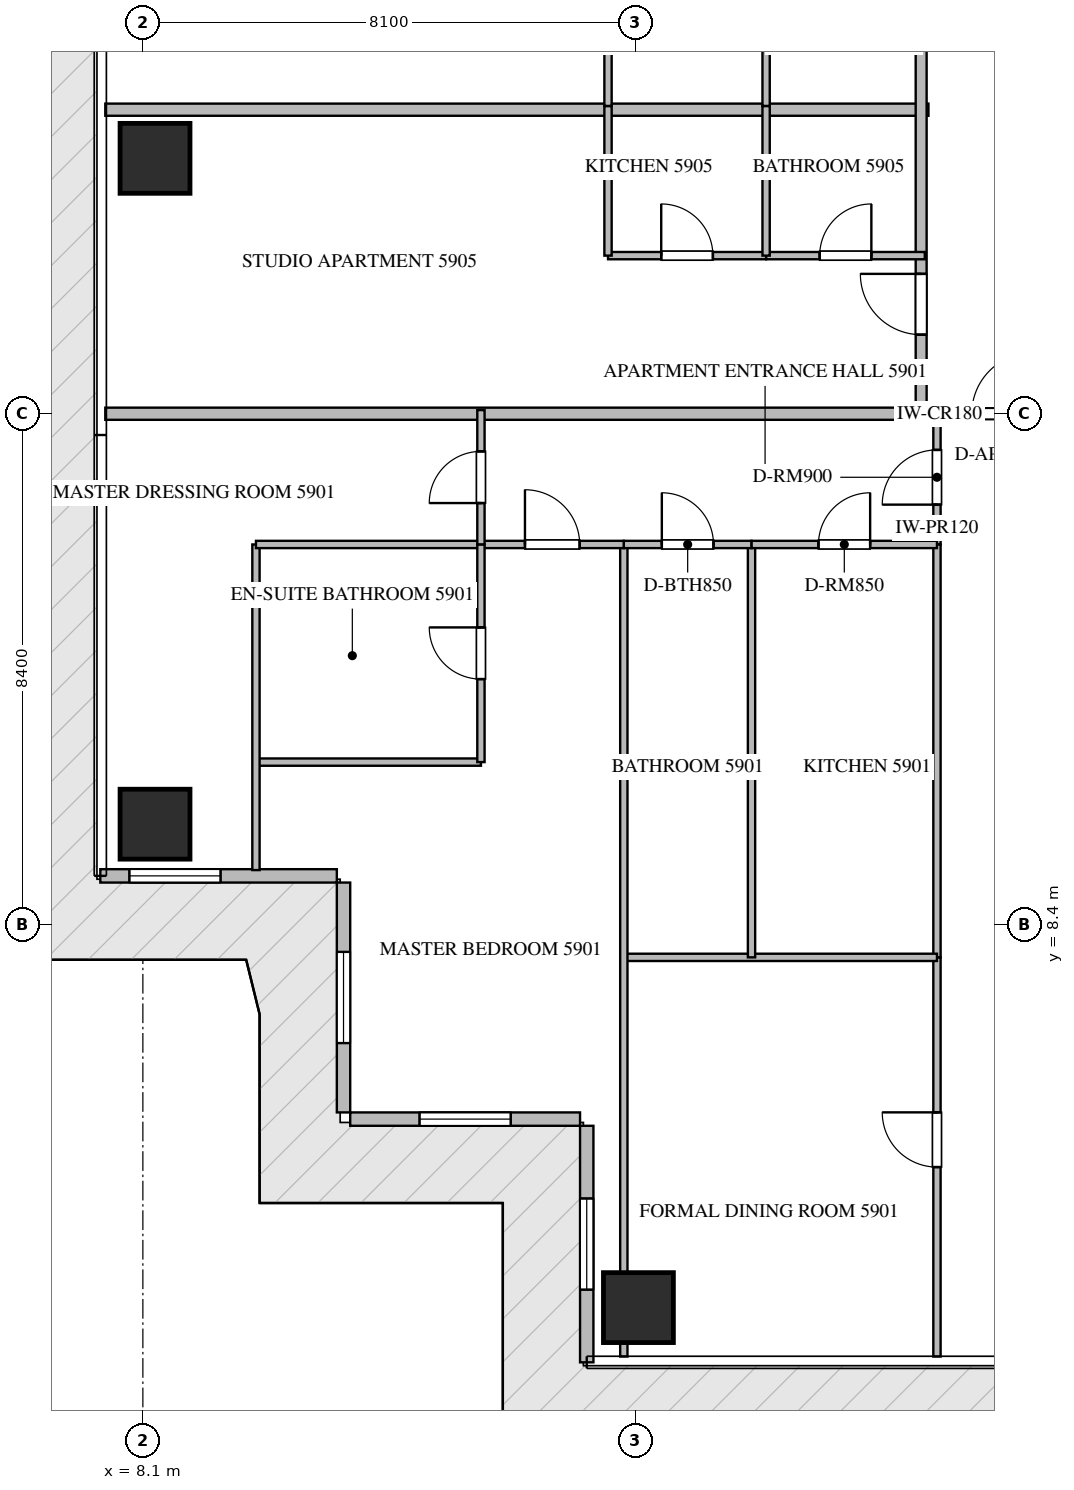
"""IFC4 building model, lengths in metres.
Left out: names, types, materials, properties, quantities, classifications, styles, units other than length and angle.
Written with IfcOpenShell. Run it as: python <this file> out.ifc"""

import sys

from ifc_helpers import new_model, si_unit, direction, frame, frame_2d, origin, origin_2d, place, context, subcontext, project, spatial, rectangle, extrude, source, transform, mapped, element, fill, save


model = new_model("IFC4")
c1 = context("Model", 3, precision=1e-05, world=origin(), true_north=direction((0.0, 1.0)))
c2 = subcontext(c1, "Body", "Model", "MODEL_VIEW")
j1 = project(units=[si_unit("LENGTHUNIT", "METRE"), si_unit("PLANEANGLEUNIT", "RADIAN")], contexts=[c1])
p1 = place(None, origin())
s1 = spatial("IfcSite", under=j1, at=p1, CompositionType="ELEMENT")
p2 = place(p1, origin())
s2 = spatial("IfcBuilding", under=s1, at=p2, CompositionType="ELEMENT")
p3 = place(p2, frame((0.0, 0.0, 237.4)))
s3 = spatial("IfcBuildingStorey", under=s2, at=p3, CompositionType="ELEMENT", Elevation=237.4)
m1 = source(origin(), c2, "Body", "SweptSolid", [
    extrude(rectangle(XDim=1.15, YDim=1.15, at=origin_2d()), origin(), (0.0, 0.0, 1.0), 3.85),
])
for number, where, z_axis, x_axis in (
    (1, (16.25, 2.1, -0.26), (0.0, 0.0, 1.0), (1.0, 0.0, 0.0)),
    (2, (8.3, 10.05, -0.26), (0.0, 0.0, 1.0), (1.0, 0.0, 0.0)),
    (3, (8.3, 21.0, -0.26), (0.0, 0.0, 1.0), (1.0, 0.0, 0.0)),
):
    element("IfcColumn", number, at=place(p3, frame(where, z_axis=z_axis, x_axis=x_axis)), inside=s3, PredefinedType="COLUMN", context=c2, shape_type="MappedRepresentation", body=[
        mapped(m1, transform((0.0, 0.0, 0.0), scale=1.0)),
    ])
p4 = place(p3, frame((7.4, 9.2, 0.0), z_axis=(0.0, 0.0, 1.0), x_axis=(1.0, 0.0, 0.0)))
e4 = element("IfcWall", 4, at=p4, inside=s3, PredefinedType="ELEMENTEDWALL", context=c2, shape_type="SweptSolid", body=[
    extrude(rectangle(XDim=3.89, YDim=0.22, at=frame_2d((1.945, 0.0))), origin(), (0.0, 0.0, 1.0), 3.575),
])
p5 = place(p4, frame((0.478, 0.0, 0.65)))
e5 = element("IfcOpeningElement", 5, at=p5, cuts=e4, PredefinedType="OPENING", context=c2, shape_type="SweptSolid", body=[
    extrude(rectangle(XDim=1.5, YDim=2.25, at=frame_2d((0.75, 1.125))), frame((0.0, 0.12, 0.0), z_axis=(0.0, -1.0, 0.0), x_axis=(1.0, 0.0, 0.0)), (0.0, 0.0, 1.0), 0.24),
])
p6 = place(p3, frame((11.4, 9.09, 0.0), z_axis=(0.0, 0.0, 1.0), x_axis=(0.0, -1.0, 0.0)))
e6 = element("IfcWall", 6, at=p6, inside=s3, PredefinedType="ELEMENTEDWALL", context=c2, shape_type="SweptSolid", body=[
    extrude(rectangle(XDim=3.78, YDim=0.22, at=frame_2d((1.89, 0.0))), origin(), (0.0, 0.0, 1.0), 3.575),
])
p7 = place(p6, frame((1.14, 0.0, 0.65)))
e7 = element("IfcOpeningElement", 7, at=p7, cuts=e6, PredefinedType="OPENING", context=c2, shape_type="SweptSolid", body=[
    extrude(rectangle(XDim=1.5, YDim=2.25, at=frame_2d((0.75, 1.125))), frame((0.0, 0.12, 0.0), z_axis=(0.0, -1.0, 0.0), x_axis=(1.0, 0.0, 0.0)), (0.0, 0.0, 1.0), 0.24),
])
p8 = place(p3, frame((11.51, 5.2, 0.0), z_axis=(0.0, 0.0, 1.0), x_axis=(1.0, 0.0, 0.0)))
e8 = element("IfcWall", 8, at=p8, inside=s3, PredefinedType="ELEMENTEDWALL", context=c2, shape_type="SweptSolid", body=[
    extrude(rectangle(XDim=3.78, YDim=0.22, at=frame_2d((1.89, 0.0))), origin(), (0.0, 0.0, 1.0), 3.575),
])
p9 = place(p8, frame((1.14, 0.0, 0.65)))
e9 = element("IfcOpeningElement", 9, at=p9, cuts=e8, PredefinedType="OPENING", context=c2, shape_type="SweptSolid", body=[
    extrude(rectangle(XDim=1.5, YDim=2.25, at=frame_2d((0.75, 1.125))), frame((0.0, 0.12, 0.0), z_axis=(0.0, -1.0, 0.0), x_axis=(1.0, 0.0, 0.0)), (0.0, 0.0, 1.0), 0.24),
])
p10 = place(p3, frame((15.4, 5.09, 0.0), z_axis=(0.0, 0.0, 1.0), x_axis=(0.0, -1.0, 0.0)))
e10 = element("IfcWall", 10, at=p10, inside=s3, PredefinedType="ELEMENTEDWALL", context=c2, shape_type="SweptSolid", body=[
    extrude(rectangle(XDim=3.89, YDim=0.22, at=frame_2d((1.945, 0.0))), origin(), (0.0, 0.0, 1.0), 3.575),
])
p11 = place(p10, frame((1.195, 0.0, 0.65)))
e11 = element("IfcOpeningElement", 11, at=p11, cuts=e10, PredefinedType="OPENING", context=c2, shape_type="SweptSolid", body=[
    extrude(rectangle(XDim=1.5, YDim=2.25, at=frame_2d((0.75, 1.125))), frame((0.0, 0.12, 0.0), z_axis=(0.0, -1.0, 0.0), x_axis=(1.0, 0.0, 0.0)), (0.0, 0.0, 1.0), 0.24),
])
p12 = place(p3, frame((7.482, 21.8, 0.0), z_axis=(0.0, 0.0, 1.0), x_axis=(1.0, 0.0, 0.0)))
e12 = element("IfcWall", 12, at=p12, inside=s3, PredefinedType="PARTITIONING", context=c2, shape_type="SweptSolid", body=[
    extrude(rectangle(XDim=13.538, YDim=0.2, at=frame_2d((6.769, 0.0))), origin(), (0.0, 0.0, 1.0), 3.59),
])
p13 = place(p3, frame((7.482, 16.8, 0.0), z_axis=(0.0, 0.0, 1.0), x_axis=(1.0, 0.0, 0.0)))
e13 = element("IfcWall", 13, at=p13, inside=s3, PredefinedType="PARTITIONING", context=c2, shape_type="SweptSolid", body=[
    extrude(rectangle(XDim=13.418, YDim=0.2, at=frame_2d((6.709, 0.0))), origin(), (0.0, 0.0, 1.0), 3.59),
])
p14 = place(p3, frame((20.902, 16.8, 0.0), z_axis=(0.0, 0.0, 1.0), x_axis=(1.0, 0.0, 0.0)))
e14 = element("IfcWall", 14, at=p14, inside=s3, PredefinedType="PARTITIONING", context=c2, shape_type="SweptSolid", body=[
    extrude(rectangle(XDim=2.496, YDim=0.18, at=frame_2d((1.248, 0.0))), origin(), (0.0, 0.0, 1.0), 3.59),
])
p15 = place(p14, frame((0.83, 0.0, 0.0)))
e15 = element("IfcOpeningElement", 15, at=p15, cuts=e14, PredefinedType="OPENING", context=c2, shape_type="SweptSolid", body=[
    extrude(rectangle(XDim=1.0, YDim=2.15, at=frame_2d((0.5, 1.075))), frame((0.0, 0.1, 0.0), z_axis=(0.0, -1.0, 0.0), x_axis=(1.0, 0.0, 0.0)), (0.0, 0.0, 1.0), 0.2),
])
p16 = place(p3, frame((20.9, 16.8, 0.0), z_axis=(0.0, 0.0, 1.0), x_axis=(0.0, 1.0, 0.0)))
e16 = element("IfcWall", 16, at=p16, inside=s3, PredefinedType="PARTITIONING", context=c2, shape_type="SweptSolid", body=[
    extrude(rectangle(XDim=16.8, YDim=0.18, at=frame_2d((8.4, 0.0))), origin(), (0.0, 0.0, 1.0), 3.59),
])
p17 = place(p16, frame((1.3, 0.0, 0.0)))
e17 = element("IfcOpeningElement", 17, at=p17, cuts=e16, PredefinedType="OPENING", context=c2, shape_type="SweptSolid", body=[
    extrude(rectangle(XDim=1.0, YDim=2.15, at=frame_2d((0.5, 1.075))), frame((0.0, 0.1, 0.0), z_axis=(0.0, -1.0, 0.0), x_axis=(1.0, 0.0, 0.0)), (0.0, 0.0, 1.0), 0.2),
])
p18 = place(p16, frame((9.18, 0.0, 0.0)))
e18 = element("IfcOpeningElement", 18, at=p18, cuts=e16, PredefinedType="OPENING", context=c2, shape_type="SweptSolid", body=[
    extrude(rectangle(XDim=1.0, YDim=2.15, at=frame_2d((0.5, 1.075))), frame((0.0, 0.1, 0.0), z_axis=(0.0, -1.0, 0.0), x_axis=(1.0, 0.0, 0.0)), (0.0, 0.0, 1.0), 0.2),
])
p19 = place(p16, frame((14.5, 0.0, 0.0)))
e19 = element("IfcOpeningElement", 19, at=p19, cuts=e16, PredefinedType="OPENING", context=c2, shape_type="SweptSolid", body=[
    extrude(rectangle(XDim=1.0, YDim=2.15, at=frame_2d((0.5, 1.075))), frame((0.0, 0.1, 0.0), z_axis=(0.0, -1.0, 0.0), x_axis=(1.0, 0.0, 0.0)), (0.0, 0.0, 1.0), 0.2),
])
p20 = place(p3, frame((21.16, 14.65, 0.0), z_axis=(0.0, 0.0, 1.0), x_axis=(0.0, 1.0, 0.0)))
e20 = element("IfcWall", 20, at=p20, inside=s3, PredefinedType="PARTITIONING", context=c2, shape_type="SweptSolid", body=[
    extrude(rectangle(XDim=2.21, YDim=0.12, at=frame_2d((1.105, 0.0))), origin(), (0.0, 0.0, 1.0), 3.59),
])
p21 = place(p20, frame((0.655, 0.0, 0.0)))
e21 = element("IfcOpeningElement", 21, at=p21, cuts=e20, PredefinedType="OPENING", context=c2, shape_type="SweptSolid", body=[
    extrude(rectangle(XDim=0.9, YDim=2.1, at=frame_2d((0.45, 1.05))), frame((0.0, 0.07, 0.0), z_axis=(0.0, -1.0, 0.0), x_axis=(1.0, 0.0, 0.0)), (0.0, 0.0, 1.0), 0.14),
])
p22 = place(p3, frame((21.16, 1.295, 0.0), z_axis=(0.0, 0.0, 1.0), x_axis=(0.0, 1.0, 0.0)))
e22 = element("IfcWall", 22, at=p22, inside=s3, PredefinedType="PARTITIONING", context=c2, shape_type="SweptSolid", body=[
    extrude(rectangle(XDim=6.565, YDim=0.12, at=frame_2d((3.283, 0.0))), origin(), (0.0, 0.0, 1.0), 3.59),
])
p23 = place(p22, frame((3.116, 0.0, 0.0)))
e23 = element("IfcOpeningElement", 23, at=p23, cuts=e22, PredefinedType="OPENING", context=c2, shape_type="SweptSolid", body=[
    extrude(rectangle(XDim=0.9, YDim=2.1, at=frame_2d((0.45, 1.05))), frame((0.0, 0.07, 0.0), z_axis=(0.0, -1.0, 0.0), x_axis=(1.0, 0.0, 0.0)), (0.0, 0.0, 1.0), 0.14),
])
p24 = place(p3, frame((21.16, 7.862, 0.0), z_axis=(0.0, 0.0, 1.0), x_axis=(0.0, 1.0, 0.0)))
e24 = element("IfcWall", 24, at=p24, inside=s3, PredefinedType="PARTITIONING", context=c2, shape_type="SweptSolid", body=[
    extrude(rectangle(XDim=6.786, YDim=0.12, at=frame_2d((3.393, 0.0))), origin(), (0.0, 0.0, 1.0), 3.59),
])
p25 = place(p3, frame((16.01, 7.86, 0.0), z_axis=(0.0, 0.0, 1.0), x_axis=(1.0, 0.0, 0.0)))
e25 = element("IfcWall", 25, at=p25, inside=s3, PredefinedType="PARTITIONING", context=c2, shape_type="SweptSolid", body=[
    extrude(rectangle(XDim=5.15, YDim=0.12, at=frame_2d((2.575, 0.0))), origin(), (0.0, 0.0, 1.0), 3.59),
])
p26 = place(p3, frame((16.01, 1.295, 0.0), z_axis=(0.0, 0.0, 1.0), x_axis=(0.0, 1.0, 0.0)))
e26 = element("IfcWall", 26, at=p26, inside=s3, PredefinedType="PARTITIONING", context=c2, shape_type="SweptSolid", body=[
    extrude(rectangle(XDim=13.355, YDim=0.12, at=frame_2d((6.677, 0.0))), origin(), (0.0, 0.0, 1.0), 3.122),
])
p27 = place(p3, frame((18.11, 7.86, 0.0), z_axis=(0.0, 0.0, 1.0), x_axis=(0.0, 1.0, 0.0)))
e27 = element("IfcWall", 27, at=p27, inside=s3, PredefinedType="PARTITIONING", context=c2, shape_type="SweptSolid", body=[
    extrude(rectangle(XDim=6.79, YDim=0.12, at=frame_2d((3.395, 0.0))), origin(), (0.0, 0.0, 1.0), 3.59),
])
p28 = place(p3, frame((16.01, 14.65, 0.0), z_axis=(0.0, 0.0, 1.0), x_axis=(1.0, 0.0, 0.0)))
e28 = element("IfcWall", 28, at=p28, inside=s3, PredefinedType="PARTITIONING", context=c2, shape_type="SweptSolid", body=[
    extrude(rectangle(XDim=2.1, YDim=0.12, at=frame_2d((1.05, 0.0))), origin(), (0.0, 0.0, 1.0), 3.59),
])
p29 = place(p28, frame((0.625, 0.0, 0.0)))
e29 = element("IfcOpeningElement", 29, at=p29, cuts=e28, PredefinedType="OPENING", context=c2, shape_type="SweptSolid", body=[
    extrude(rectangle(XDim=0.85, YDim=2.1, at=frame_2d((0.425, 1.05))), frame((0.0, 0.07, 0.0), z_axis=(0.0, -1.0, 0.0), x_axis=(1.0, 0.0, 0.0)), (0.0, 0.0, 1.0), 0.14),
])
p30 = place(p3, frame((18.112, 14.65, 0.0), z_axis=(0.0, 0.0, 1.0), x_axis=(1.0, 0.0, 0.0)))
e30 = element("IfcWall", 30, at=p30, inside=s3, PredefinedType="PARTITIONING", context=c2, shape_type="SweptSolid", body=[
    extrude(rectangle(XDim=3.048, YDim=0.12, at=frame_2d((1.524, 0.0))), origin(), (0.0, 0.0, 1.0), 3.59),
])
p31 = place(p30, frame((1.099, 0.0, 0.0)))
e31 = element("IfcOpeningElement", 31, at=p31, cuts=e30, PredefinedType="OPENING", context=c2, shape_type="SweptSolid", body=[
    extrude(rectangle(XDim=0.85, YDim=2.1, at=frame_2d((0.425, 1.05))), frame((0.0, 0.07, 0.0), z_axis=(0.0, -1.0, 0.0), x_axis=(1.0, 0.0, 0.0)), (0.0, 0.0, 1.0), 0.14),
])
p32 = place(p3, frame((13.66, 14.65, 0.0), z_axis=(0.0, 0.0, 1.0), x_axis=(1.0, 0.0, 0.0)))
e32 = element("IfcWall", 32, at=p32, inside=s3, PredefinedType="PARTITIONING", context=c2, shape_type="SweptSolid", body=[
    extrude(rectangle(XDim=2.348, YDim=0.12, at=frame_2d((1.174, 0.0))), origin(), (0.0, 0.0, 1.0), 3.59),
])
p33 = place(p32, frame((0.724, 0.0, 0.0)))
e33 = element("IfcOpeningElement", 33, at=p33, cuts=e32, PredefinedType="OPENING", context=c2, shape_type="SweptSolid", body=[
    extrude(rectangle(XDim=0.9, YDim=2.1, at=frame_2d((0.45, 1.05))), frame((0.0, 0.07, 0.0), z_axis=(0.0, -1.0, 0.0), x_axis=(1.0, 0.0, 0.0)), (0.0, 0.0, 1.0), 0.14),
])
p34 = place(p3, frame((9.96, 11.071, 0.0), z_axis=(0.0, 0.0, 1.0), x_axis=(1.0, 0.0, 0.0)))
e34 = element("IfcWall", 34, at=p34, inside=s3, PredefinedType="PARTITIONING", context=c2, shape_type="SweptSolid", body=[
    extrude(rectangle(XDim=3.7, YDim=0.12, at=frame_2d((1.85, 0.0))), origin(), (0.0, 0.0, 1.0), 3.59),
])
p35 = place(p3, frame((9.96, 9.295, 0.0), z_axis=(0.0, 0.0, 1.0), x_axis=(0.0, 1.0, 0.0)))
e35 = element("IfcWall", 35, at=p35, inside=s3, PredefinedType="PARTITIONING", context=c2, shape_type="SweptSolid", body=[
    extrude(rectangle(XDim=5.355, YDim=0.12, at=frame_2d((2.677, 0.0))), origin(), (0.0, 0.0, 1.0), 3.59),
])
p36 = place(p3, frame((9.96, 14.65, 0.0), z_axis=(0.0, 0.0, 1.0), x_axis=(1.0, 0.0, 0.0)))
e36 = element("IfcWall", 36, at=p36, inside=s3, PredefinedType="PARTITIONING", context=c2, shape_type="SweptSolid", body=[
    extrude(rectangle(XDim=3.698, YDim=0.12, at=frame_2d((1.849, 0.0))), origin(), (0.0, 0.0, 1.0), 3.59),
])
p37 = place(p3, frame((13.66, 11.071, 0.0), z_axis=(0.0, 0.0, 1.0), x_axis=(0.0, 1.0, 0.0)))
e37 = element("IfcWall", 37, at=p37, inside=s3, PredefinedType="PARTITIONING", context=c2, shape_type="SweptSolid", body=[
    extrude(rectangle(XDim=3.579, YDim=0.12, at=frame_2d((1.79, 0.0))), origin(), (0.0, 0.0, 1.0), 3.59),
])
p38 = place(p37, frame((1.365, 0.0, 0.0)))
e38 = element("IfcOpeningElement", 38, at=p38, cuts=e37, PredefinedType="OPENING", context=c2, shape_type="SweptSolid", body=[
    extrude(rectangle(XDim=0.85, YDim=2.1, at=frame_2d((0.425, 1.05))), frame((0.0, 0.07, 0.0), z_axis=(0.0, -1.0, 0.0), x_axis=(1.0, 0.0, 0.0)), (0.0, 0.0, 1.0), 0.14),
])
p39 = place(p3, frame((13.66, 14.652, 0.0), z_axis=(0.0, 0.0, 1.0), x_axis=(0.0, 1.0, 0.0)))
e39 = element("IfcWall", 39, at=p39, inside=s3, PredefinedType="PARTITIONING", context=c2, shape_type="SweptSolid", body=[
    extrude(rectangle(XDim=2.208, YDim=0.12, at=frame_2d((1.104, 0.0))), origin(), (0.0, 0.0, 1.0), 3.59),
])
p40 = place(p39, frame((0.679, 0.0, 0.0)))
e40 = element("IfcOpeningElement", 40, at=p40, cuts=e39, PredefinedType="OPENING", context=c2, shape_type="SweptSolid", body=[
    extrude(rectangle(XDim=0.85, YDim=2.1, at=frame_2d((0.425, 1.05))), frame((0.0, 0.07, 0.0), z_axis=(0.0, -1.0, 0.0), x_axis=(1.0, 0.0, 0.0)), (0.0, 0.0, 1.0), 0.14),
])
p41 = place(p3, frame((15.75, 19.4, 0.0), z_axis=(0.0, 0.0, 1.0), x_axis=(1.0, 0.0, 0.0)))
e41 = element("IfcWall", 41, at=p41, inside=s3, PredefinedType="PARTITIONING", context=c2, shape_type="SweptSolid", body=[
    extrude(rectangle(XDim=2.6, YDim=0.12, at=frame_2d((1.3, 0.0))), origin(), (0.0, 0.0, 1.0), 3.59),
])
p42 = place(p41, frame((0.875, 0.0, 0.0)))
e42 = element("IfcOpeningElement", 42, at=p42, cuts=e41, PredefinedType="OPENING", context=c2, shape_type="SweptSolid", body=[
    extrude(rectangle(XDim=0.85, YDim=2.1, at=frame_2d((0.425, 1.05))), frame((0.0, 0.07, 0.0), z_axis=(0.0, -1.0, 0.0), x_axis=(1.0, 0.0, 0.0)), (0.0, 0.0, 1.0), 0.14),
])
p43 = place(p3, frame((18.352, 19.4, 0.0), z_axis=(0.0, 0.0, 1.0), x_axis=(1.0, 0.0, 0.0)))
e43 = element("IfcWall", 43, at=p43, inside=s3, PredefinedType="PARTITIONING", context=c2, shape_type="SweptSolid", body=[
    extrude(rectangle(XDim=2.608, YDim=0.12, at=frame_2d((1.304, 0.0))), origin(), (0.0, 0.0, 1.0), 3.59),
])
p44 = place(p43, frame((0.879, 0.0, 0.0)))
e44 = element("IfcOpeningElement", 44, at=p44, cuts=e43, PredefinedType="OPENING", context=c2, shape_type="SweptSolid", body=[
    extrude(rectangle(XDim=0.85, YDim=2.1, at=frame_2d((0.425, 1.05))), frame((0.0, 0.07, 0.0), z_axis=(0.0, -1.0, 0.0), x_axis=(1.0, 0.0, 0.0)), (0.0, 0.0, 1.0), 0.14),
])
for number, where, z_axis, x_axis in (
    (45, (18.35, 19.4, 0.0), (0.0, 0.0, 1.0), (0.0, 1.0, 0.0)),
    (46, (15.75, 19.4, 0.0), (0.0, 0.0, 1.0), (0.0, 1.0, 0.0)),
):
    element("IfcWall", number, at=place(p3, frame(where, z_axis=z_axis, x_axis=x_axis)), inside=s3, PredefinedType="PARTITIONING", context=c2, shape_type="SweptSolid", body=[
        extrude(rectangle(XDim=2.46, YDim=0.12, at=frame_2d((1.23, 0.0))), origin(), (0.0, 0.0, 1.0), 3.59),
    ])
for number, where, z_axis, x_axis in (
    (47, (18.35, 21.862, 0.0), (0.0, 0.0, 1.0), (0.0, 1.0, 0.0)),
    (48, (15.75, 21.862, 0.0), (0.0, 0.0, 1.0), (0.0, 1.0, 0.0)),
):
    element("IfcWall", number, at=place(p3, frame(where, z_axis=z_axis, x_axis=x_axis)), inside=s3, PredefinedType="PARTITIONING", context=c2, shape_type="SweptSolid", body=[
        extrude(rectangle(XDim=2.688, YDim=0.12, at=frame_2d((1.344, 0.0))), origin(), (0.0, 0.0, 1.0), 3.59),
    ])
m2 = source(origin(), c2, "Body", "SweptSolid", [
    extrude(rectangle(XDim=1.5, YDim=2.25, at=frame_2d((0.75, 1.125))), frame((0.0, 0.03, 0.0), z_axis=(0.0, -1.0, 0.0), x_axis=(1.0, 0.0, 0.0)), (0.0, 0.0, 1.0), 0.06),
])
p45 = place(p5, origin())
e49 = element("IfcWindow", 49, at=p45, inside=s3, PartitioningType="SINGLE_PANEL", PredefinedType="WINDOW", context=c2, shape_type="MappedRepresentation", body=[
    mapped(m2, transform((0.0, 0.0, 0.0), scale=1.0)),
])
fill(e5, e49)
p46 = place(p7, origin())
e50 = element("IfcWindow", 50, at=p46, inside=s3, PartitioningType="SINGLE_PANEL", PredefinedType="WINDOW", context=c2, shape_type="MappedRepresentation", body=[
    mapped(m2, transform((0.0, 0.0, 0.0), scale=1.0)),
])
fill(e7, e50)
p47 = place(p9, origin())
e51 = element("IfcWindow", 51, at=p47, inside=s3, PartitioningType="SINGLE_PANEL", PredefinedType="WINDOW", context=c2, shape_type="MappedRepresentation", body=[
    mapped(m2, transform((0.0, 0.0, 0.0), scale=1.0)),
])
fill(e9, e51)
p48 = place(p11, origin())
e52 = element("IfcWindow", 52, at=p48, inside=s3, PartitioningType="SINGLE_PANEL", PredefinedType="WINDOW", context=c2, shape_type="MappedRepresentation", body=[
    mapped(m2, transform((0.0, 0.0, 0.0), scale=1.0)),
])
fill(e11, e52)
m3 = source(origin(), c2, "Body", "SweptSolid", [
    extrude(rectangle(XDim=1.0, YDim=2.15, at=frame_2d((0.5, 1.075))), frame((0.0, 0.025, 0.0), z_axis=(0.0, -1.0, 0.0), x_axis=(1.0, 0.0, 0.0)), (0.0, 0.0, 1.0), 0.05),
])
p49 = place(p15, origin())
e53 = element("IfcDoor", 53, at=p49, inside=s3, OperationType="SINGLE_SWING_RIGHT", PredefinedType="DOOR", context=c2, shape_type="MappedRepresentation", body=[
    mapped(m3, transform((0.0, 0.0, 0.0), scale=1.0)),
])
fill(e15, e53)
p50 = place(p17, origin())
e54 = element("IfcDoor", 54, at=p50, inside=s3, OperationType="SINGLE_SWING_RIGHT", PredefinedType="DOOR", context=c2, shape_type="MappedRepresentation", body=[
    mapped(m3, transform((0.0, 0.0, 0.0), scale=1.0)),
])
fill(e17, e54)
m4 = source(origin(), c2, "Body", "SweptSolid", [
    extrude(rectangle(XDim=0.9, YDim=2.1, at=frame_2d((0.45, 1.05))), frame((0.0, 0.025, 0.0), z_axis=(0.0, -1.0, 0.0), x_axis=(1.0, 0.0, 0.0)), (0.0, 0.0, 1.0), 0.05),
])
p51 = place(p21, origin())
e55 = element("IfcDoor", 55, at=p51, inside=s3, OperationType="SINGLE_SWING_LEFT", PredefinedType="DOOR", context=c2, shape_type="MappedRepresentation", body=[
    mapped(m4, transform((0.0, 0.0, 0.0), scale=1.0)),
])
fill(e21, e55)
p52 = place(p23, origin())
e56 = element("IfcDoor", 56, at=p52, inside=s3, OperationType="SINGLE_SWING_RIGHT", PredefinedType="DOOR", context=c2, shape_type="MappedRepresentation", body=[
    mapped(m4, transform((0.0, 0.0, 0.0), scale=1.0)),
])
fill(e23, e56)
m5 = source(origin(), c2, "Body", "SweptSolid", [
    extrude(rectangle(XDim=0.85, YDim=2.1, at=frame_2d((0.425, 1.05))), frame((0.0, 0.025, 0.0), z_axis=(0.0, -1.0, 0.0), x_axis=(1.0, 0.0, 0.0)), (0.0, 0.0, 1.0), 0.05),
])
p53 = place(p29, origin())
e57 = element("IfcDoor", 57, at=p53, inside=s3, OperationType="SINGLE_SWING_LEFT", PredefinedType="DOOR", context=c2, shape_type="MappedRepresentation", body=[
    mapped(m5, transform((0.0, 0.0, 0.0), scale=1.0)),
])
fill(e29, e57)
p54 = place(p31, origin())
e58 = element("IfcDoor", 58, at=p54, inside=s3, OperationType="SINGLE_SWING_RIGHT", PredefinedType="DOOR", context=c2, shape_type="MappedRepresentation", body=[
    mapped(m5, transform((0.0, 0.0, 0.0), scale=1.0)),
])
fill(e31, e58)
p55 = place(p33, origin())
e59 = element("IfcDoor", 59, at=p55, inside=s3, OperationType="SINGLE_SWING_LEFT", PredefinedType="DOOR", context=c2, shape_type="MappedRepresentation", body=[
    mapped(m4, transform((0.0, 0.0, 0.0), scale=1.0)),
])
fill(e33, e59)
p56 = place(p38, origin())
e60 = element("IfcDoor", 60, at=p56, inside=s3, OperationType="SINGLE_SWING_RIGHT", PredefinedType="DOOR", context=c2, shape_type="MappedRepresentation", body=[
    mapped(m5, transform((0.0, 0.0, 0.0), scale=1.0)),
])
fill(e38, e60)
p57 = place(p40, origin())
e61 = element("IfcDoor", 61, at=p57, inside=s3, OperationType="SINGLE_SWING_LEFT", PredefinedType="DOOR", context=c2, shape_type="MappedRepresentation", body=[
    mapped(m5, transform((0.0, 0.0, 0.0), scale=1.0)),
])
fill(e40, e61)
p58 = place(p42, origin())
e62 = element("IfcDoor", 62, at=p58, inside=s3, OperationType="SINGLE_SWING_LEFT", PredefinedType="DOOR", context=c2, shape_type="MappedRepresentation", body=[
    mapped(m5, transform((0.0, 0.0, 0.0), scale=1.0)),
])
fill(e42, e62)
p59 = place(p44, origin())
e63 = element("IfcDoor", 63, at=p59, inside=s3, OperationType="SINGLE_SWING_RIGHT", PredefinedType="DOOR", context=c2, shape_type="MappedRepresentation", body=[
    mapped(m5, transform((0.0, 0.0, 0.0), scale=1.0)),
])
fill(e44, e63)
save(model, sys.argv[1])
